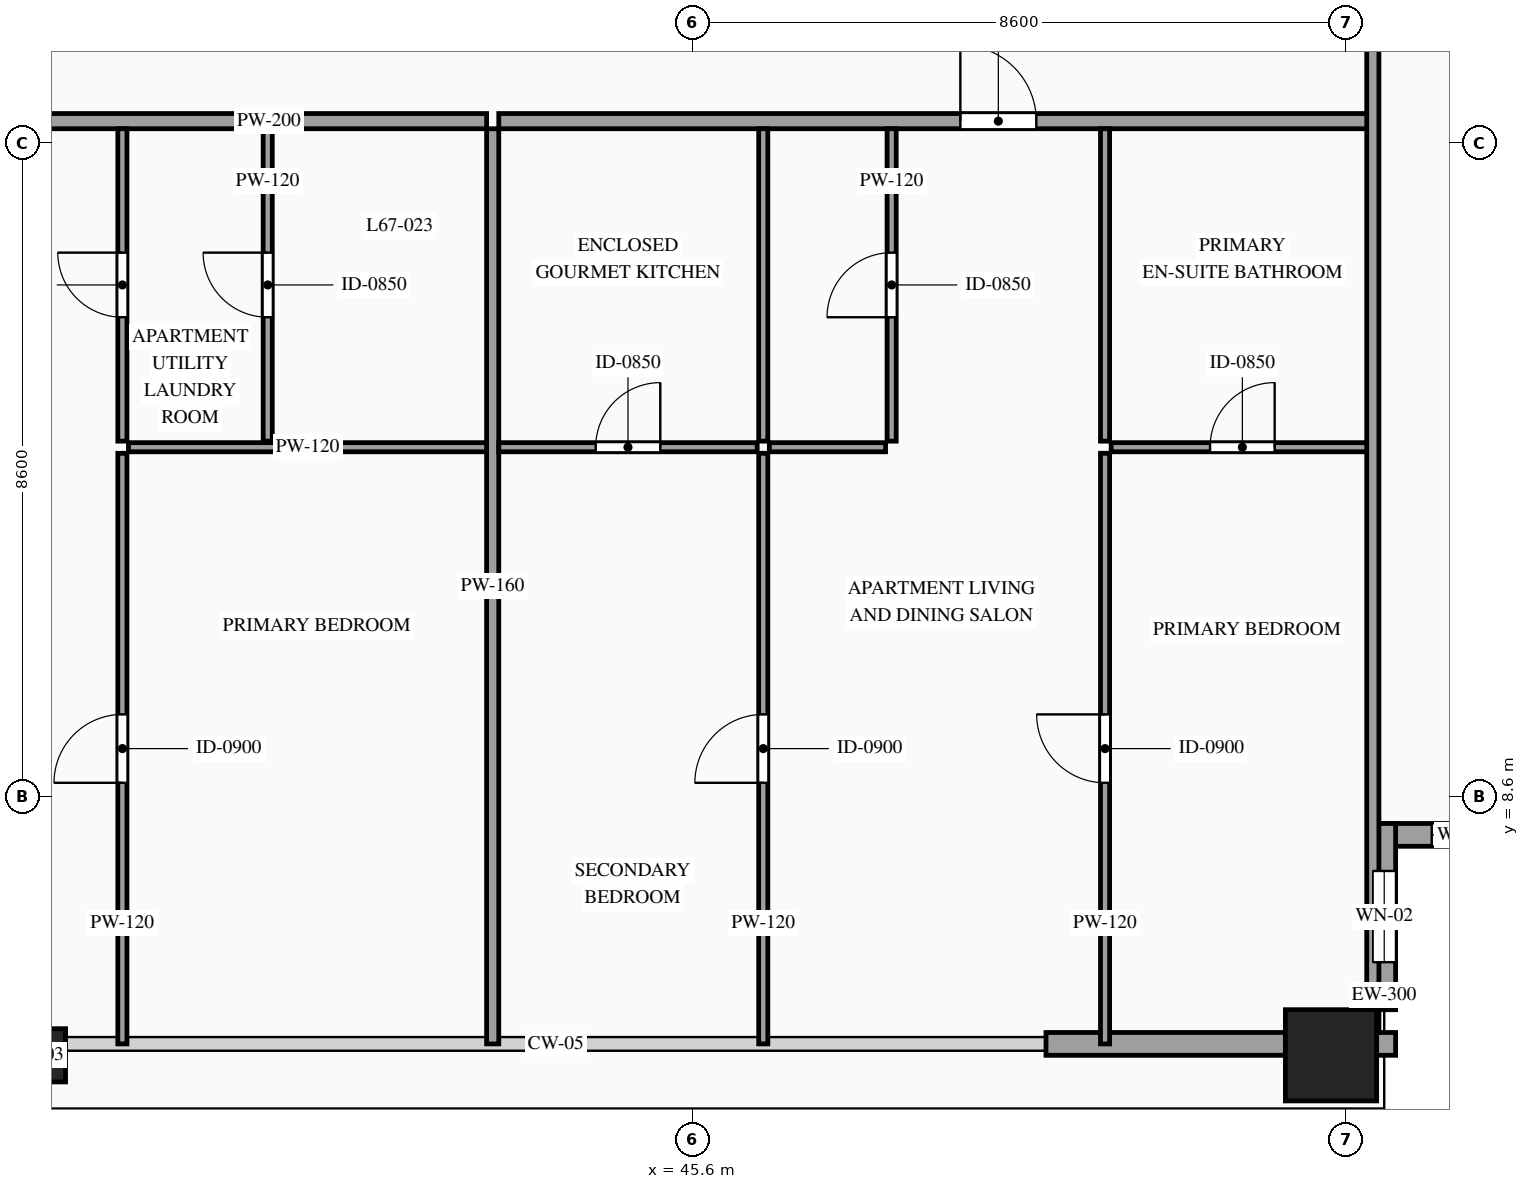
"""IFC4 building model, lengths in metres.
Left out: names, types, materials, properties, quantities, classifications, styles, units other than length and angle.
Written with IfcOpenShell. Run it as: python <this file> out.ifc"""

import sys

from ifc_helpers import new_model, si_unit, direction, frame, frame_2d, origin, origin_2d, place, context, subcontext, project, spatial, rectangle, hollow_rectangle, extrude, source, transform, mapped, element, fill, save


model = new_model("IFC4")
c1 = context("Model", 3, precision=1e-05, world=origin(), true_north=direction((0.0, 1.0)))
c2 = subcontext(c1, "Body", "Model", "MODEL_VIEW")
j1 = project(units=[si_unit("LENGTHUNIT", "METRE"), si_unit("PLANEANGLEUNIT", "RADIAN")], contexts=[c1])
p1 = place(None, origin())
s1 = spatial("IfcSite", under=j1, at=p1, CompositionType="ELEMENT")
p2 = place(p1, origin())
s2 = spatial("IfcBuilding", under=s1, at=p2, CompositionType="ELEMENT")
p3 = place(p2, frame((0.0, 0.0, 252.1)))
s3 = spatial("IfcBuildingStorey", under=s2, at=p3, CompositionType="ELEMENT", Elevation=252.1)
m1 = source(origin(), c2, "Body", "SweptSolid", [
    extrude(hollow_rectangle(XDim=0.7, YDim=0.7, WallThickness=0.032, at=origin_2d()), origin(), (0.0, 0.0, 1.0), 3.5),
])
p4 = place(p3, frame((37.0, 5.2, 0.0), z_axis=(0.0, 0.0, 1.0), x_axis=(1.0, 0.0, 0.0)))
e1 = element("IfcColumn", 1, at=p4, inside=s3, PredefinedType="COLUMN", context=c2, shape_type="MappedRepresentation", body=[
    mapped(m1, transform((0.0, 0.0, 0.0), scale=1.0)),
])
m2 = source(origin(), c2, "Body", "SweptSolid", [
    extrude(hollow_rectangle(XDim=1.2, YDim=1.2, WallThickness=0.055, at=origin_2d()), origin(), (0.0, 0.0, 1.0), 3.5),
])
p5 = place(p3, frame((54.0, 5.2, 0.0), z_axis=(0.0, 0.0, 1.0), x_axis=(1.0, 0.0, 0.0)))
e2 = element("IfcColumn", 2, at=p5, inside=s3, PredefinedType="COLUMN", context=c2, shape_type="MappedRepresentation", body=[
    mapped(m2, transform((0.0, 0.0, 0.0), scale=1.0)),
])
p6 = place(p3, frame((54.55, 8.1, 0.0), z_axis=(0.0, 0.0, 1.0), x_axis=(1.0, 0.0, 0.0)))
e3 = element("IfcWall", 3, at=p6, inside=s3, PredefinedType="SOLIDWALL", context=c2, shape_type="SweptSolid", body=[
    extrude(rectangle(XDim=2.45, YDim=0.3, at=frame_2d((1.225, 0.0))), origin(), (0.0, 0.0, 1.0), 3.28),
])
p7 = place(p6, frame((0.775, 0.0, 0.85)))
e4 = element("IfcOpeningElement", 4, at=p7, cuts=e3, PredefinedType="OPENING", context=c2, shape_type="SweptSolid", body=[
    extrude(rectangle(XDim=0.9, YDim=1.5, at=frame_2d((0.45, 0.75))), frame((0.0, 0.165, 0.0), z_axis=(0.0, -1.0, 0.0), x_axis=(1.0, 0.0, 0.0)), (0.0, 0.0, 1.0), 0.33),
])
p8 = place(p3, frame((54.7, 5.8, 0.0), z_axis=(0.0, 0.0, 1.0), x_axis=(0.0, 1.0, 0.0)))
e5 = element("IfcWall", 5, at=p8, inside=s3, PredefinedType="SOLIDWALL", context=c2, shape_type="SweptSolid", body=[
    extrude(rectangle(XDim=2.45, YDim=0.3, at=frame_2d((1.225, 0.0))), origin(), (0.0, 0.0, 1.0), 3.28),
])
p9 = place(p8, frame((0.625, 0.0, 0.85)))
e6 = element("IfcOpeningElement", 6, at=p9, cuts=e5, PredefinedType="OPENING", context=c2, shape_type="SweptSolid", body=[
    extrude(rectangle(XDim=1.2, YDim=2.1, at=frame_2d((0.6, 1.05))), frame((0.0, 0.165, 0.0), z_axis=(0.0, -1.0, 0.0), x_axis=(1.0, 0.0, 0.0)), (0.0, 0.0, 1.0), 0.33),
])
m3 = source(origin(), c2, "Body", "SweptSolid", [
    extrude(rectangle(XDim=0.25, YDim=0.3, at=frame_2d((0.125, 0.0))), origin(), (0.0, 0.0, 1.0), 3.28),
])
p10 = place(p3, frame((54.6, 5.35, 0.0), z_axis=(0.0, 0.0, 1.0), x_axis=(1.0, 0.0, 0.0)))
e7 = element("IfcWall", 7, at=p10, inside=s3, PredefinedType="SOLIDWALL", context=c2, shape_type="MappedRepresentation", body=[
    mapped(m3, transform((0.0, 0.0, 0.0), scale=1.0)),
])
m4 = source(origin(), c2, "Body", "SweptSolid", [
    extrude(rectangle(XDim=3.15, YDim=0.3, at=frame_2d((1.575, 0.0))), origin(), (0.0, 0.0, 1.0), 2.835),
])
p11 = place(p3, frame((50.25, 5.35, 0.0), z_axis=(0.0, 0.0, 1.0), x_axis=(1.0, 0.0, 0.0)))
e8 = element("IfcWall", 8, at=p11, inside=s3, PredefinedType="SOLIDWALL", context=c2, shape_type="MappedRepresentation", body=[
    mapped(m4, transform((0.0, 0.0, 0.0), scale=1.0)),
])
p12 = place(p3, frame((31.11, 17.49, 0.0), z_axis=(0.0, 0.0, 1.0), x_axis=(1.0, 0.0, 0.0)))
e9 = element("IfcWall", 9, at=p12, inside=s3, PredefinedType="PARTITIONING", context=c2, shape_type="SweptSolid", body=[
    extrude(rectangle(XDim=11.78, YDim=0.2, at=frame_2d((5.89, 0.0))), origin(), (0.0, 0.0, 1.0), 3.28),
])
p13 = place(p12, frame((4.801, 0.0, 0.0)))
e10 = element("IfcOpeningElement", 10, at=p13, cuts=e9, PredefinedType="OPENING", context=c2, shape_type="SweptSolid", body=[
    extrude(rectangle(XDim=1.0, YDim=2.2, at=frame_2d((0.5, 1.1))), frame((0.0, 0.115, 0.0), z_axis=(0.0, -1.0, 0.0), x_axis=(1.0, 0.0, 0.0)), (0.0, 0.0, 1.0), 0.23),
])
m5 = source(origin(), c2, "Body", "SweptSolid", [
    extrude(rectangle(XDim=12.04, YDim=0.16, at=frame_2d((6.02, 0.0))), origin(), (0.0, 0.0, 1.0), 3.28),
])
p14 = place(p3, frame((42.97, 5.35, 0.0), z_axis=(0.0, 0.0, 1.0), x_axis=(0.0, 1.0, 0.0)))
e11 = element("IfcWall", 11, at=p14, inside=s3, PredefinedType="PARTITIONING", context=c2, shape_type="MappedRepresentation", body=[
    mapped(m5, transform((0.0, 0.0, 0.0), scale=1.0)),
])
p15 = place(p3, frame((40.01, 13.28, 0.0), z_axis=(0.0, 0.0, 1.0), x_axis=(0.0, 1.0, 0.0)))
e12 = element("IfcWall", 12, at=p15, inside=s3, PredefinedType="PARTITIONING", context=c2, shape_type="SweptSolid", body=[
    extrude(rectangle(XDim=4.11, YDim=0.12, at=frame_2d((2.055, 0.0))), origin(), (0.0, 0.0, 1.0), 3.28),
])
p16 = place(p15, frame((1.63, 0.0, 0.0)))
e13 = element("IfcOpeningElement", 13, at=p16, cuts=e12, PredefinedType="OPENING", context=c2, shape_type="SweptSolid", body=[
    extrude(rectangle(XDim=0.85, YDim=2.1, at=frame_2d((0.425, 1.05))), frame((0.0, 0.075, 0.0), z_axis=(0.0, -1.0, 0.0), x_axis=(1.0, 0.0, 0.0)), (0.0, 0.0, 1.0), 0.15),
])
m6 = source(origin(), c2, "Body", "SweptSolid", [
    extrude(rectangle(XDim=4.712, YDim=0.12, at=frame_2d((2.356, 0.0))), origin(), (0.0, 0.0, 1.0), 3.28),
])
p17 = place(p3, frame((38.178, 13.2, 0.0), z_axis=(0.0, 0.0, 1.0), x_axis=(1.0, 0.0, 0.0)))
e14 = element("IfcWall", 14, at=p17, inside=s3, PredefinedType="PARTITIONING", context=c2, shape_type="MappedRepresentation", body=[
    mapped(m6, transform((0.0, 0.0, 0.0), scale=1.0)),
])
p18 = place(p3, frame((38.098, 5.35, 0.0), z_axis=(0.0, 0.0, 1.0), x_axis=(0.0, 1.0, 0.0)))
e15 = element("IfcWall", 15, at=p18, inside=s3, PredefinedType="PARTITIONING", context=c2, shape_type="SweptSolid", body=[
    extrude(rectangle(XDim=7.77, YDim=0.12, at=frame_2d((3.885, 0.0))), origin(), (0.0, 0.0, 1.0), 3.28),
])
p19 = place(p18, frame((3.435, 0.0, 0.0)))
e16 = element("IfcOpeningElement", 16, at=p19, cuts=e15, PredefinedType="OPENING", context=c2, shape_type="SweptSolid", body=[
    extrude(rectangle(XDim=0.9, YDim=2.15, at=frame_2d((0.45, 1.075))), frame((0.0, 0.075, 0.0), z_axis=(0.0, -1.0, 0.0), x_axis=(1.0, 0.0, 0.0)), (0.0, 0.0, 1.0), 0.15),
])
p20 = place(p3, frame((38.098, 13.28, 0.0), z_axis=(0.0, 0.0, 1.0), x_axis=(0.0, 1.0, 0.0)))
e17 = element("IfcWall", 17, at=p20, inside=s3, PredefinedType="PARTITIONING", context=c2, shape_type="SweptSolid", body=[
    extrude(rectangle(XDim=4.11, YDim=0.12, at=frame_2d((2.055, 0.0))), origin(), (0.0, 0.0, 1.0), 3.28),
])
p21 = place(p20, frame((1.63, 0.0, 0.0)))
e18 = element("IfcOpeningElement", 18, at=p21, cuts=e17, PredefinedType="OPENING", context=c2, shape_type="SweptSolid", body=[
    extrude(rectangle(XDim=0.85, YDim=2.1, at=frame_2d((0.425, 1.05))), frame((0.0, 0.075, 0.0), z_axis=(0.0, -1.0, 0.0), x_axis=(1.0, 0.0, 0.0)), (0.0, 0.0, 1.0), 0.15),
])
p22 = place(p3, frame((43.05, 17.49, 0.0), z_axis=(0.0, 0.0, 1.0), x_axis=(1.0, 0.0, 0.0)))
e19 = element("IfcWall", 19, at=p22, inside=s3, PredefinedType="PARTITIONING", context=c2, shape_type="SweptSolid", body=[
    extrude(rectangle(XDim=11.51, YDim=0.2, at=frame_2d((5.755, 0.0))), origin(), (0.0, 0.0, 1.0), 3.28),
])
p23 = place(p22, frame((6.073, 0.0, 0.0)))
e20 = element("IfcOpeningElement", 20, at=p23, cuts=e19, PredefinedType="OPENING", context=c2, shape_type="SweptSolid", body=[
    extrude(rectangle(XDim=1.0, YDim=2.2, at=frame_2d((0.5, 1.1))), frame((0.0, 0.115, 0.0), z_axis=(0.0, -1.0, 0.0), x_axis=(1.0, 0.0, 0.0)), (0.0, 0.0, 1.0), 0.23),
])
p24 = place(p3, frame((43.05, 13.2, 0.0), z_axis=(0.0, 0.0, 1.0), x_axis=(1.0, 0.0, 0.0)))
e21 = element("IfcWall", 21, at=p24, inside=s3, PredefinedType="PARTITIONING", context=c2, shape_type="SweptSolid", body=[
    extrude(rectangle(XDim=3.4, YDim=0.12, at=frame_2d((1.7, 0.0))), origin(), (0.0, 0.0, 1.0), 3.28),
])
p25 = place(p24, frame((1.275, 0.0, 0.0)))
e22 = element("IfcOpeningElement", 22, at=p25, cuts=e21, PredefinedType="OPENING", context=c2, shape_type="SweptSolid", body=[
    extrude(rectangle(XDim=0.85, YDim=2.1, at=frame_2d((0.425, 1.05))), frame((0.0, 0.075, 0.0), z_axis=(0.0, -1.0, 0.0), x_axis=(1.0, 0.0, 0.0)), (0.0, 0.0, 1.0), 0.15),
])
m7 = source(origin(), c2, "Body", "SweptSolid", [
    extrude(rectangle(XDim=4.11, YDim=0.12, at=frame_2d((2.055, 0.0))), origin(), (0.0, 0.0, 1.0), 3.28),
])
p26 = place(p3, frame((46.53, 13.28, 0.0), z_axis=(0.0, 0.0, 1.0), x_axis=(0.0, 1.0, 0.0)))
e23 = element("IfcWall", 23, at=p26, inside=s3, PredefinedType="PARTITIONING", context=c2, shape_type="MappedRepresentation", body=[
    mapped(m7, transform((0.0, 0.0, 0.0), scale=1.0)),
])
m8 = source(origin(), c2, "Body", "SweptSolid", [
    extrude(rectangle(XDim=1.529, YDim=0.12, at=frame_2d((0.764, 0.0))), origin(), (0.0, 0.0, 1.0), 3.28),
])
p27 = place(p3, frame((46.61, 13.2, 0.0), z_axis=(0.0, 0.0, 1.0), x_axis=(1.0, 0.0, 0.0)))
e24 = element("IfcWall", 24, at=p27, inside=s3, PredefinedType="PARTITIONING", context=c2, shape_type="MappedRepresentation", body=[
    mapped(m8, transform((0.0, 0.0, 0.0), scale=1.0)),
])
p28 = place(p3, frame((48.219, 13.28, 0.0), z_axis=(0.0, 0.0, 1.0), x_axis=(0.0, 1.0, 0.0)))
e25 = element("IfcWall", 25, at=p28, inside=s3, PredefinedType="PARTITIONING", context=c2, shape_type="SweptSolid", body=[
    extrude(rectangle(XDim=4.11, YDim=0.12, at=frame_2d((2.055, 0.0))), origin(), (0.0, 0.0, 1.0), 3.28),
])
p29 = place(p28, frame((1.63, 0.0, 0.0)))
e26 = element("IfcOpeningElement", 26, at=p29, cuts=e25, PredefinedType="OPENING", context=c2, shape_type="SweptSolid", body=[
    extrude(rectangle(XDim=0.85, YDim=2.1, at=frame_2d((0.425, 1.05))), frame((0.0, 0.075, 0.0), z_axis=(0.0, -1.0, 0.0), x_axis=(1.0, 0.0, 0.0)), (0.0, 0.0, 1.0), 0.15),
])
p30 = place(p3, frame((51.107, 13.2, 0.0), z_axis=(0.0, 0.0, 1.0), x_axis=(1.0, 0.0, 0.0)))
e27 = element("IfcWall", 27, at=p30, inside=s3, PredefinedType="PARTITIONING", context=c2, shape_type="SweptSolid", body=[
    extrude(rectangle(XDim=3.453, YDim=0.12, at=frame_2d((1.727, 0.0))), origin(), (0.0, 0.0, 1.0), 3.28),
])
p31 = place(p30, frame((1.302, 0.0, 0.0)))
e28 = element("IfcOpeningElement", 28, at=p31, cuts=e27, PredefinedType="OPENING", context=c2, shape_type="SweptSolid", body=[
    extrude(rectangle(XDim=0.85, YDim=2.1, at=frame_2d((0.425, 1.05))), frame((0.0, 0.075, 0.0), z_axis=(0.0, -1.0, 0.0), x_axis=(1.0, 0.0, 0.0)), (0.0, 0.0, 1.0), 0.15),
])
p32 = place(p3, frame((51.027, 13.28, 0.0), z_axis=(0.0, 0.0, 1.0), x_axis=(0.0, 1.0, 0.0)))
e29 = element("IfcWall", 29, at=p32, inside=s3, PredefinedType="PARTITIONING", context=c2, shape_type="MappedRepresentation", body=[
    mapped(m7, transform((0.0, 0.0, 0.0), scale=1.0)),
])
p33 = place(p3, frame((46.53, 5.35, 0.0), z_axis=(0.0, 0.0, 1.0), x_axis=(0.0, 1.0, 0.0)))
e30 = element("IfcWall", 30, at=p33, inside=s3, PredefinedType="PARTITIONING", context=c2, shape_type="SweptSolid", body=[
    extrude(rectangle(XDim=7.77, YDim=0.12, at=frame_2d((3.885, 0.0))), origin(), (0.0, 0.0, 1.0), 3.28),
])
p34 = place(p33, frame((3.435, 0.0, 0.0)))
e31 = element("IfcOpeningElement", 31, at=p34, cuts=e30, PredefinedType="OPENING", context=c2, shape_type="SweptSolid", body=[
    extrude(rectangle(XDim=0.9, YDim=2.15, at=frame_2d((0.45, 1.075))), frame((0.0, 0.075, 0.0), z_axis=(0.0, -1.0, 0.0), x_axis=(1.0, 0.0, 0.0)), (0.0, 0.0, 1.0), 0.15),
])
p35 = place(p3, frame((51.027, 5.35, 0.0), z_axis=(0.0, 0.0, 1.0), x_axis=(0.0, 1.0, 0.0)))
e32 = element("IfcWall", 32, at=p35, inside=s3, PredefinedType="PARTITIONING", context=c2, shape_type="SweptSolid", body=[
    extrude(rectangle(XDim=7.77, YDim=0.12, at=frame_2d((3.885, 0.0))), origin(), (0.0, 0.0, 1.0), 3.28),
])
p36 = place(p35, frame((3.435, 0.0, 0.0)))
e33 = element("IfcOpeningElement", 33, at=p36, cuts=e32, PredefinedType="OPENING", context=c2, shape_type="SweptSolid", body=[
    extrude(rectangle(XDim=0.9, YDim=2.15, at=frame_2d((0.45, 1.075))), frame((0.0, 0.075, 0.0), z_axis=(0.0, -1.0, 0.0), x_axis=(1.0, 0.0, 0.0)), (0.0, 0.0, 1.0), 0.15),
])
m9 = source(origin(), c2, "Body", "SweptSolid", [
    extrude(rectangle(XDim=26.69, YDim=0.16, at=frame_2d((13.345, 0.0))), origin(), (0.0, 0.0, 1.0), 3.28),
])
p37 = place(p3, frame((54.55, 5.5, 0.0), z_axis=(0.0, 0.0, 1.0), x_axis=(0.0, 1.0, 0.0)))
e34 = element("IfcWall", 34, at=p37, inside=s3, PredefinedType="PARTITIONING", context=c2, shape_type="MappedRepresentation", body=[
    mapped(m9, transform((0.0, 0.0, 0.0), scale=1.0)),
])
m10 = source(origin(), c2, "Body", "SweptSolid", [
    extrude(rectangle(XDim=0.9, YDim=1.5, at=frame_2d((0.45, 0.75))), frame((0.0, 0.03, 0.0), z_axis=(0.0, -1.0, 0.0), x_axis=(1.0, 0.0, 0.0)), (0.0, 0.0, 1.0), 0.06),
])
p38 = place(p7, origin())
e35 = element("IfcWindow", 35, at=p38, inside=s3, PartitioningType="SINGLE_PANEL", PredefinedType="WINDOW", context=c2, shape_type="MappedRepresentation", body=[
    mapped(m10, transform((0.0, 0.0, 0.0), scale=1.0)),
])
fill(e4, e35)
m11 = source(origin(), c2, "Body", "SweptSolid", [
    extrude(rectangle(XDim=1.2, YDim=2.1, at=frame_2d((0.6, 1.05))), frame((0.0, 0.03, 0.0), z_axis=(0.0, -1.0, 0.0), x_axis=(1.0, 0.0, 0.0)), (0.0, 0.0, 1.0), 0.06),
])
p39 = place(p9, origin())
e36 = element("IfcWindow", 36, at=p39, inside=s3, PartitioningType="SINGLE_PANEL", PredefinedType="WINDOW", context=c2, shape_type="MappedRepresentation", body=[
    mapped(m11, transform((0.0, 0.0, 0.0), scale=1.0)),
])
fill(e6, e36)
m12 = source(origin(), c2, "Body", "SweptSolid", [
    extrude(rectangle(XDim=0.85, YDim=2.1, at=frame_2d((0.425, 1.05))), frame((0.0, 0.025, 0.0), z_axis=(0.0, -1.0, 0.0), x_axis=(1.0, 0.0, 0.0)), (0.0, 0.0, 1.0), 0.05),
])
p40 = place(p16, origin())
e37 = element("IfcDoor", 37, at=p40, inside=s3, OperationType="SINGLE_SWING_RIGHT", PredefinedType="DOOR", context=c2, shape_type="MappedRepresentation", body=[
    mapped(m12, transform((0.0, 0.0, 0.0), scale=1.0)),
])
fill(e13, e37)
m13 = source(origin(), c2, "Body", "SweptSolid", [
    extrude(rectangle(XDim=0.9, YDim=2.15, at=frame_2d((0.45, 1.075))), frame((0.0, 0.025, 0.0), z_axis=(0.0, -1.0, 0.0), x_axis=(1.0, 0.0, 0.0)), (0.0, 0.0, 1.0), 0.05),
])
p41 = place(p19, origin())
e38 = element("IfcDoor", 38, at=p41, inside=s3, OperationType="SINGLE_SWING_LEFT", PredefinedType="DOOR", context=c2, shape_type="MappedRepresentation", body=[
    mapped(m13, transform((0.0, 0.0, 0.0), scale=1.0)),
])
fill(e16, e38)
p42 = place(p21, origin())
e39 = element("IfcDoor", 39, at=p42, inside=s3, OperationType="SINGLE_SWING_RIGHT", PredefinedType="DOOR", context=c2, shape_type="MappedRepresentation", body=[
    mapped(m12, transform((0.0, 0.0, 0.0), scale=1.0)),
])
fill(e18, e39)
m14 = source(origin(), c2, "Body", "SweptSolid", [
    extrude(rectangle(XDim=1.0, YDim=2.2, at=frame_2d((0.5, 1.1))), frame((0.0, 0.025, 0.0), z_axis=(0.0, -1.0, 0.0), x_axis=(1.0, 0.0, 0.0)), (0.0, 0.0, 1.0), 0.05),
])
p43 = place(p23, origin())
e40 = element("IfcDoor", 40, at=p43, inside=s3, OperationType="SINGLE_SWING_LEFT", PredefinedType="DOOR", context=c2, shape_type="MappedRepresentation", body=[
    mapped(m14, transform((0.0, 0.0, 0.0), scale=1.0)),
])
fill(e20, e40)
p44 = place(p25, origin())
e41 = element("IfcDoor", 41, at=p44, inside=s3, OperationType="SINGLE_SWING_RIGHT", PredefinedType="DOOR", context=c2, shape_type="MappedRepresentation", body=[
    mapped(m12, transform((0.0, 0.0, 0.0), scale=1.0)),
])
fill(e22, e41)
p45 = place(p29, origin())
e42 = element("IfcDoor", 42, at=p45, inside=s3, OperationType="SINGLE_SWING_LEFT", PredefinedType="DOOR", context=c2, shape_type="MappedRepresentation", body=[
    mapped(m12, transform((0.0, 0.0, 0.0), scale=1.0)),
])
fill(e26, e42)
p46 = place(p31, origin())
e43 = element("IfcDoor", 43, at=p46, inside=s3, OperationType="SINGLE_SWING_RIGHT", PredefinedType="DOOR", context=c2, shape_type="MappedRepresentation", body=[
    mapped(m12, transform((0.0, 0.0, 0.0), scale=1.0)),
])
fill(e28, e43)
p47 = place(p34, origin())
e44 = element("IfcDoor", 44, at=p47, inside=s3, OperationType="SINGLE_SWING_LEFT", PredefinedType="DOOR", context=c2, shape_type="MappedRepresentation", body=[
    mapped(m13, transform((0.0, 0.0, 0.0), scale=1.0)),
])
fill(e31, e44)
p48 = place(p36, origin())
e45 = element("IfcDoor", 45, at=p48, inside=s3, OperationType="SINGLE_SWING_RIGHT", PredefinedType="DOOR", context=c2, shape_type="MappedRepresentation", body=[
    mapped(m13, transform((0.0, 0.0, 0.0), scale=1.0)),
])
fill(e33, e45)
save(model, sys.argv[1])
